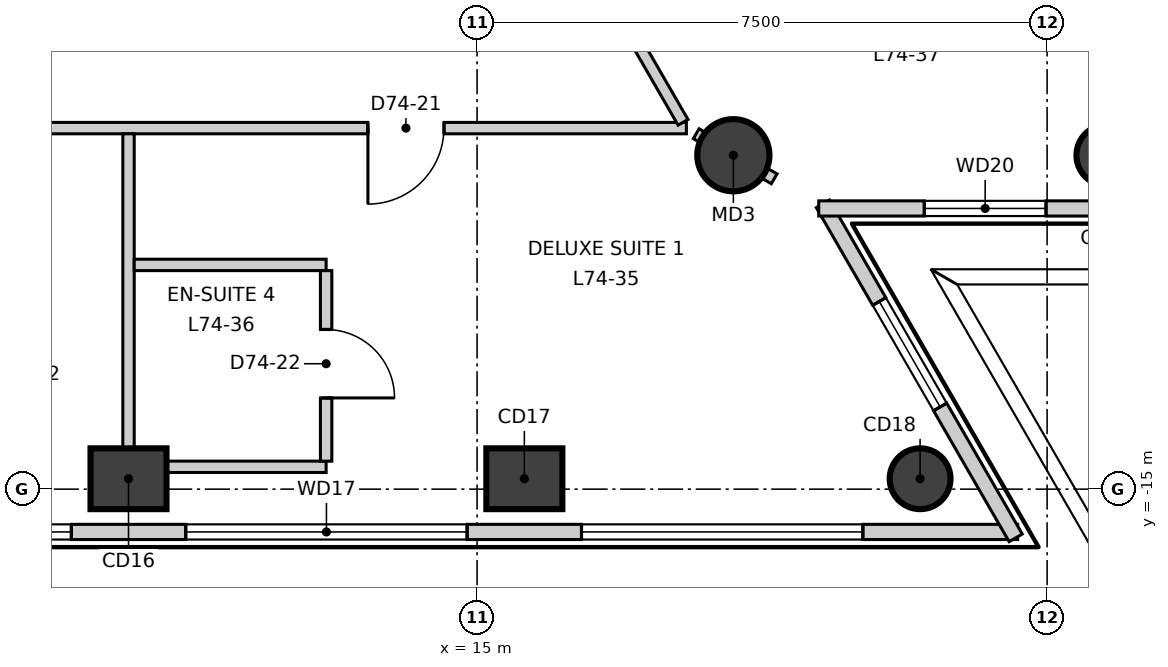
"""IFC4 building model, lengths in metres.
Left out: names, types, materials, properties, quantities, classifications, styles, units other than length and angle.
Written with IfcOpenShell. Run it as: python <this file> out.ifc"""

import sys

from ifc_helpers import new_model, si_unit, direction, frame, frame_2d, origin, origin_2d, place, context, subcontext, project, spatial, rectangle, circle, extrude, element, fill, save


model = new_model("IFC4")
c1 = context("Model", 3, precision=1e-05, world=origin(), true_north=direction((0.0, 1.0)))
c2 = subcontext(c1, "Body", "Model", "MODEL_VIEW")
j1 = project(units=[si_unit("LENGTHUNIT", "METRE"), si_unit("PLANEANGLEUNIT", "RADIAN")], contexts=[c1])
p1 = place(None, origin())
s1 = spatial("IfcSite", under=j1, at=p1, CompositionType="ELEMENT")
p2 = place(p1, origin())
s2 = spatial("IfcBuilding", under=s1, at=p2, CompositionType="ELEMENT")
p3 = place(p2, frame((0.0, 0.0, 311.5)))
s3 = spatial("IfcBuildingStorey", under=s2, at=p3, CompositionType="ELEMENT", Elevation=311.5)
for number, where, z_axis, x_axis in (
    (1, (10.414, -14.863, -0.3), (0.0, 0.0, 1.0), (1.0, 0.0, 0.0)),
    (2, (15.622, -14.863, -0.3), (0.0, 0.0, 1.0), (1.0, 0.0, 0.0)),
):
    element("IfcColumn", number, at=place(p3, frame(where, z_axis=z_axis, x_axis=x_axis)), inside=s3, PredefinedType="COLUMN", context=c2, shape_type="SweptSolid", body=[
        extrude(rectangle(XDim=1.0, YDim=0.8, at=origin_2d()), origin(), (0.0, 0.0, 1.0), 3.6),
    ])
for number, where, z_axis, x_axis in (
    (3, (20.829, -14.863, -0.3), (0.0, 0.0, 1.0), (1.0, 0.0, 0.0)),
    (4, (23.286, -10.607, -0.3), (0.0, 0.0, 1.0), (-0.5, 0.866, 0.0)),
):
    element("IfcColumn", number, at=place(p3, frame(where, z_axis=z_axis, x_axis=x_axis)), inside=s3, PredefinedType="COLUMN", context=c2, shape_type="SweptSolid", body=[
        extrude(circle(Radius=0.4, at=origin_2d()), origin(), (0.0, 0.0, 1.0), 3.6),
    ])
p4 = place(p3, frame((18.372, -10.607, -0.3), z_axis=(0.0, 0.0, 1.0), x_axis=(1.0, 0.0, 0.0)))
e5 = element("IfcColumn", 5, at=p4, inside=s3, PredefinedType="COLUMN", context=c2, shape_type="SweptSolid", body=[
    extrude(circle(Radius=0.475, at=origin_2d()), origin(), (0.0, 0.0, 1.0), 3.6),
])
p5 = place(p3, frame((-22.132, -15.563, 0.0), z_axis=(0.0, 0.0, 1.0), x_axis=(1.0, 0.0, 0.0)))
e6 = element("IfcWall", 6, at=p5, inside=s3, PredefinedType="ELEMENTEDWALL", context=c2, shape_type="SweptSolid", body=[
    extrude(rectangle(XDim=44.244, YDim=0.2, at=frame_2d((22.122, 0.0))), origin(), (0.0, 0.0, 1.0), 3.3),
])
p6 = place(p5, frame((2.057, 0.0, 0.9)))
e7 = element("IfcOpeningElement", 7, at=p6, cuts=e6, PredefinedType="OPENING", context=c2, shape_type="SweptSolid", body=[
    extrude(rectangle(XDim=3.7, YDim=2.2, at=frame_2d((1.85, 1.1))), frame((0.0, 0.11, 0.0), z_axis=(0.0, -1.0, 0.0), x_axis=(1.0, 0.0, 0.0)), (0.0, 0.0, 1.0), 0.22),
])
p7 = place(p5, frame((7.264, 0.0, 0.9)))
e8 = element("IfcOpeningElement", 8, at=p7, cuts=e6, PredefinedType="OPENING", context=c2, shape_type="SweptSolid", body=[
    extrude(rectangle(XDim=3.7, YDim=2.2, at=frame_2d((1.85, 1.1))), frame((0.0, 0.11, 0.0), z_axis=(0.0, -1.0, 0.0), x_axis=(1.0, 0.0, 0.0)), (0.0, 0.0, 1.0), 0.22),
])
p8 = place(p5, frame((12.471, 0.0, 0.9)))
e9 = element("IfcOpeningElement", 9, at=p8, cuts=e6, PredefinedType="OPENING", context=c2, shape_type="SweptSolid", body=[
    extrude(rectangle(XDim=3.7, YDim=2.2, at=frame_2d((1.85, 1.1))), frame((0.0, 0.11, 0.0), z_axis=(0.0, -1.0, 0.0), x_axis=(1.0, 0.0, 0.0)), (0.0, 0.0, 1.0), 0.22),
])
p9 = place(p5, frame((17.678, 0.0, 0.9)))
e10 = element("IfcOpeningElement", 10, at=p9, cuts=e6, PredefinedType="OPENING", context=c2, shape_type="SweptSolid", body=[
    extrude(rectangle(XDim=3.7, YDim=2.2, at=frame_2d((1.85, 1.1))), frame((0.0, 0.11, 0.0), z_axis=(0.0, -1.0, 0.0), x_axis=(1.0, 0.0, 0.0)), (0.0, 0.0, 1.0), 0.22),
])
p10 = place(p5, frame((22.886, 0.0, 0.9)))
e11 = element("IfcOpeningElement", 11, at=p10, cuts=e6, PredefinedType="OPENING", context=c2, shape_type="SweptSolid", body=[
    extrude(rectangle(XDim=3.7, YDim=2.2, at=frame_2d((1.85, 1.1))), frame((0.0, 0.11, 0.0), z_axis=(0.0, -1.0, 0.0), x_axis=(1.0, 0.0, 0.0)), (0.0, 0.0, 1.0), 0.22),
])
p11 = place(p5, frame((28.093, 0.0, 0.9)))
e12 = element("IfcOpeningElement", 12, at=p11, cuts=e6, PredefinedType="OPENING", context=c2, shape_type="SweptSolid", body=[
    extrude(rectangle(XDim=3.7, YDim=2.2, at=frame_2d((1.85, 1.1))), frame((0.0, 0.11, 0.0), z_axis=(0.0, -1.0, 0.0), x_axis=(1.0, 0.0, 0.0)), (0.0, 0.0, 1.0), 0.22),
])
p12 = place(p5, frame((33.3, 0.0, 0.9)))
e13 = element("IfcOpeningElement", 13, at=p12, cuts=e6, PredefinedType="OPENING", context=c2, shape_type="SweptSolid", body=[
    extrude(rectangle(XDim=3.7, YDim=2.2, at=frame_2d((1.85, 1.1))), frame((0.0, 0.11, 0.0), z_axis=(0.0, -1.0, 0.0), x_axis=(1.0, 0.0, 0.0)), (0.0, 0.0, 1.0), 0.22),
])
p13 = place(p5, frame((38.507, 0.0, 0.9)))
e14 = element("IfcOpeningElement", 14, at=p13, cuts=e6, PredefinedType="OPENING", context=c2, shape_type="SweptSolid", body=[
    extrude(rectangle(XDim=3.7, YDim=2.2, at=frame_2d((1.85, 1.1))), frame((0.0, 0.11, 0.0), z_axis=(0.0, -1.0, 0.0), x_axis=(1.0, 0.0, 0.0)), (0.0, 0.0, 1.0), 0.22),
])
p14 = place(p3, frame((22.087, -15.641, 0.0), z_axis=(0.0, 0.0, 1.0), x_axis=(-0.499911250765, 0.866076637116, 0.0)))
e15 = element("IfcWall", 15, at=p14, inside=s3, PredefinedType="ELEMENTEDWALL", context=c2, shape_type="SweptSolid", body=[
    extrude(rectangle(XDim=5.075, YDim=0.2, at=frame_2d((2.537, 0.0))), origin(), (0.0, 0.0, 1.0), 3.3),
])
p15 = place(p14, frame((1.99, 0.0, 0.9)))
e16 = element("IfcOpeningElement", 16, at=p15, cuts=e15, PredefinedType="OPENING", context=c2, shape_type="SweptSolid", body=[
    extrude(rectangle(XDim=1.6, YDim=2.2, at=frame_2d((0.8, 1.1))), frame((0.0, 0.11, 0.0), z_axis=(0.0, -1.0, 0.0), x_axis=(1.0, 0.0, 0.0)), (0.0, 0.0, 1.0), 0.22),
])
p16 = place(p3, frame((19.495, -11.307, 0.0), z_axis=(0.0, 0.0, 1.0), x_axis=(1.0, 0.0, 0.0)))
e17 = element("IfcWall", 17, at=p16, inside=s3, PredefinedType="ELEMENTEDWALL", context=c2, shape_type="SweptSolid", body=[
    extrude(rectangle(XDim=5.074, YDim=0.2, at=frame_2d((2.537, 0.0))), origin(), (0.0, 0.0, 1.0), 3.3),
])
p17 = place(p16, frame((1.39, 0.0, 0.9)))
e18 = element("IfcOpeningElement", 18, at=p17, cuts=e17, PredefinedType="OPENING", context=c2, shape_type="SweptSolid", body=[
    extrude(rectangle(XDim=1.6, YDim=2.2, at=frame_2d((0.8, 1.1))), frame((0.0, 0.11, 0.0), z_axis=(0.0, -1.0, 0.0), x_axis=(1.0, 0.0, 0.0)), (0.0, 0.0, 1.0), 0.22),
])
p18 = place(p3, frame((24.544, -11.385, 0.0), z_axis=(0.0, 0.0, 1.0), x_axis=(-0.500002044679, 0.866024223285, 0.0)))
e19 = element("IfcWall", 19, at=p18, inside=s3, PredefinedType="ELEMENTEDWALL", context=c2, shape_type="SweptSolid", body=[
    extrude(rectangle(XDim=44.243, YDim=0.2, at=frame_2d((22.122, 0.0))), origin(), (0.0, 0.0, 1.0), 3.3),
])
p19 = place(p18, frame((2.056, 0.0, 0.9)))
e20 = element("IfcOpeningElement", 20, at=p19, cuts=e19, PredefinedType="OPENING", context=c2, shape_type="SweptSolid", body=[
    extrude(rectangle(XDim=3.7, YDim=2.2, at=frame_2d((1.85, 1.1))), frame((0.0, 0.11, 0.0), z_axis=(0.0, -1.0, 0.0), x_axis=(1.0, 0.0, 0.0)), (0.0, 0.0, 1.0), 0.22),
])
p20 = place(p18, frame((7.264, 0.0, 0.9)))
e21 = element("IfcOpeningElement", 21, at=p20, cuts=e19, PredefinedType="OPENING", context=c2, shape_type="SweptSolid", body=[
    extrude(rectangle(XDim=3.7, YDim=2.2, at=frame_2d((1.85, 1.1))), frame((0.0, 0.11, 0.0), z_axis=(0.0, -1.0, 0.0), x_axis=(1.0, 0.0, 0.0)), (0.0, 0.0, 1.0), 0.22),
])
p21 = place(p18, frame((12.471, 0.0, 0.9)))
e22 = element("IfcOpeningElement", 22, at=p21, cuts=e19, PredefinedType="OPENING", context=c2, shape_type="SweptSolid", body=[
    extrude(rectangle(XDim=3.7, YDim=2.2, at=frame_2d((1.85, 1.1))), frame((0.0, 0.11, 0.0), z_axis=(0.0, -1.0, 0.0), x_axis=(1.0, 0.0, 0.0)), (0.0, 0.0, 1.0), 0.22),
])
p22 = place(p18, frame((17.678, 0.0, 0.9)))
e23 = element("IfcOpeningElement", 23, at=p22, cuts=e19, PredefinedType="OPENING", context=c2, shape_type="SweptSolid", body=[
    extrude(rectangle(XDim=3.7, YDim=2.2, at=frame_2d((1.85, 1.1))), frame((0.0, 0.11, 0.0), z_axis=(0.0, -1.0, 0.0), x_axis=(1.0, 0.0, 0.0)), (0.0, 0.0, 1.0), 0.22),
])
p23 = place(p18, frame((22.885, 0.0, 0.9)))
e24 = element("IfcOpeningElement", 24, at=p23, cuts=e19, PredefinedType="OPENING", context=c2, shape_type="SweptSolid", body=[
    extrude(rectangle(XDim=3.7, YDim=2.2, at=frame_2d((1.85, 1.1))), frame((0.0, 0.11, 0.0), z_axis=(0.0, -1.0, 0.0), x_axis=(1.0, 0.0, 0.0)), (0.0, 0.0, 1.0), 0.22),
])
p24 = place(p18, frame((28.093, 0.0, 0.9)))
e25 = element("IfcOpeningElement", 25, at=p24, cuts=e19, PredefinedType="OPENING", context=c2, shape_type="SweptSolid", body=[
    extrude(rectangle(XDim=3.7, YDim=2.2, at=frame_2d((1.85, 1.1))), frame((0.0, 0.11, 0.0), z_axis=(0.0, -1.0, 0.0), x_axis=(1.0, 0.0, 0.0)), (0.0, 0.0, 1.0), 0.22),
])
p25 = place(p18, frame((33.3, 0.0, 0.9)))
e26 = element("IfcOpeningElement", 26, at=p25, cuts=e19, PredefinedType="OPENING", context=c2, shape_type="SweptSolid", body=[
    extrude(rectangle(XDim=3.7, YDim=2.2, at=frame_2d((1.85, 1.1))), frame((0.0, 0.11, 0.0), z_axis=(0.0, -1.0, 0.0), x_axis=(1.0, 0.0, 0.0)), (0.0, 0.0, 1.0), 0.22),
])
p26 = place(p18, frame((38.507, 0.0, 0.9)))
e27 = element("IfcOpeningElement", 27, at=p26, cuts=e19, PredefinedType="OPENING", context=c2, shape_type="SweptSolid", body=[
    extrude(rectangle(XDim=3.7, YDim=2.2, at=frame_2d((1.85, 1.1))), frame((0.0, 0.11, 0.0), z_axis=(0.0, -1.0, 0.0), x_axis=(1.0, 0.0, 0.0)), (0.0, 0.0, 1.0), 0.22),
])
p27 = place(p3, frame((-17.604, -10.25, 0.0), z_axis=(0.0, 0.0, 1.0), x_axis=(1.0, 0.0, 0.0)))
e28 = element("IfcWall", 28, at=p27, inside=s3, PredefinedType="PARTITIONING", context=c2, shape_type="SweptSolid", body=[
    extrude(rectangle(XDim=35.358, YDim=0.15, at=frame_2d((17.679, 0.0))), origin(), (0.0, 0.0, 1.0), 3.3),
])
p28 = place(p27, frame((3.0, 0.0, 0.0)))
e29 = element("IfcOpeningElement", 29, at=p28, cuts=e28, PredefinedType="OPENING", context=c2, shape_type="SweptSolid", body=[
    extrude(rectangle(XDim=1.0, YDim=2.1, at=frame_2d((0.5, 1.05))), frame((0.0, 0.085, 0.0), z_axis=(0.0, -1.0, 0.0), x_axis=(1.0, 0.0, 0.0)), (0.0, 0.0, 1.0), 0.17),
])
p29 = place(p27, frame((15.14, 0.0, 0.0)))
e30 = element("IfcOpeningElement", 30, at=p29, cuts=e28, PredefinedType="OPENING", context=c2, shape_type="SweptSolid", body=[
    extrude(rectangle(XDim=1.0, YDim=2.1, at=frame_2d((0.5, 1.05))), frame((0.0, 0.085, 0.0), z_axis=(0.0, -1.0, 0.0), x_axis=(1.0, 0.0, 0.0)), (0.0, 0.0, 1.0), 0.17),
])
p30 = place(p27, frame((10.14, 0.0, 0.0)))
e31 = element("IfcOpeningElement", 31, at=p30, cuts=e28, PredefinedType="OPENING", context=c2, shape_type="SweptSolid", body=[
    extrude(rectangle(XDim=0.9, YDim=2.1, at=frame_2d((0.45, 1.05))), frame((0.0, 0.085, 0.0), z_axis=(0.0, -1.0, 0.0), x_axis=(1.0, 0.0, 0.0)), (0.0, 0.0, 1.0), 0.17),
])
p31 = place(p27, frame((12.24, 0.0, 0.0)))
e32 = element("IfcOpeningElement", 32, at=p31, cuts=e28, PredefinedType="OPENING", context=c2, shape_type="SweptSolid", body=[
    extrude(rectangle(XDim=0.9, YDim=2.1, at=frame_2d((0.45, 1.05))), frame((0.0, 0.085, 0.0), z_axis=(0.0, -1.0, 0.0), x_axis=(1.0, 0.0, 0.0)), (0.0, 0.0, 1.0), 0.17),
])
p32 = place(p27, frame((25.654, 0.0, 0.0)))
e33 = element("IfcOpeningElement", 33, at=p32, cuts=e28, PredefinedType="OPENING", context=c2, shape_type="SweptSolid", body=[
    extrude(rectangle(XDim=1.0, YDim=2.1, at=frame_2d((0.5, 1.05))), frame((0.0, 0.085, 0.0), z_axis=(0.0, -1.0, 0.0), x_axis=(1.0, 0.0, 0.0)), (0.0, 0.0, 1.0), 0.17),
])
p33 = place(p27, frame((20.554, 0.0, 0.0)))
e34 = element("IfcOpeningElement", 34, at=p33, cuts=e28, PredefinedType="OPENING", context=c2, shape_type="SweptSolid", body=[
    extrude(rectangle(XDim=0.9, YDim=2.1, at=frame_2d((0.45, 1.05))), frame((0.0, 0.085, 0.0), z_axis=(0.0, -1.0, 0.0), x_axis=(1.0, 0.0, 0.0)), (0.0, 0.0, 1.0), 0.17),
])
p34 = place(p27, frame((22.754, 0.0, 0.0)))
e35 = element("IfcOpeningElement", 35, at=p34, cuts=e28, PredefinedType="OPENING", context=c2, shape_type="SweptSolid", body=[
    extrude(rectangle(XDim=0.9, YDim=2.1, at=frame_2d((0.45, 1.05))), frame((0.0, 0.085, 0.0), z_axis=(0.0, -1.0, 0.0), x_axis=(1.0, 0.0, 0.0)), (0.0, 0.0, 1.0), 0.17),
])
p35 = place(p27, frame((31.168, 0.0, 0.0)))
e36 = element("IfcOpeningElement", 36, at=p35, cuts=e28, PredefinedType="OPENING", context=c2, shape_type="SweptSolid", body=[
    extrude(rectangle(XDim=1.0, YDim=2.1, at=frame_2d((0.5, 1.05))), frame((0.0, 0.085, 0.0), z_axis=(0.0, -1.0, 0.0), x_axis=(1.0, 0.0, 0.0)), (0.0, 0.0, 1.0), 0.17),
])
p36 = place(p3, frame((0.075, 20.37, 0.0), z_axis=(0.0, 0.0, 1.0), x_axis=(0.500006672087, -0.866021551619, 0.0)))
e37 = element("IfcWall", 37, at=p36, inside=s3, PredefinedType="PARTITIONING", context=c2, shape_type="SweptSolid", body=[
    extrude(rectangle(XDim=35.27, YDim=0.15, at=frame_2d((17.635, 0.0))), origin(), (0.0, 0.0, 1.0), 3.3),
])
p37 = place(p36, frame((31.206, 0.0, 0.0)))
e38 = element("IfcOpeningElement", 38, at=p37, cuts=e37, PredefinedType="OPENING", context=c2, shape_type="SweptSolid", body=[
    extrude(rectangle(XDim=1.0, YDim=2.1, at=frame_2d((0.5, 1.05))), frame((0.0, 0.085, 0.0), z_axis=(0.0, -1.0, 0.0), x_axis=(1.0, 0.0, 0.0)), (0.0, 0.0, 1.0), 0.17),
])
p38 = place(p36, frame((19.968, 0.0, 0.0)))
e39 = element("IfcOpeningElement", 39, at=p38, cuts=e37, PredefinedType="OPENING", context=c2, shape_type="SweptSolid", body=[
    extrude(rectangle(XDim=1.0, YDim=2.1, at=frame_2d((0.5, 1.05))), frame((0.0, 0.085, 0.0), z_axis=(0.0, -1.0, 0.0), x_axis=(1.0, 0.0, 0.0)), (0.0, 0.0, 1.0), 0.17),
])
p39 = place(p36, frame((13.353, 0.0, 0.0)))
e40 = element("IfcOpeningElement", 40, at=p39, cuts=e37, PredefinedType="OPENING", context=c2, shape_type="SweptSolid", body=[
    extrude(rectangle(XDim=1.0, YDim=2.1, at=frame_2d((0.5, 1.05))), frame((0.0, 0.085, 0.0), z_axis=(0.0, -1.0, 0.0), x_axis=(1.0, 0.0, 0.0)), (0.0, 0.0, 1.0), 0.17),
])
p40 = place(p36, frame((7.746, 0.0, 0.0)))
e41 = element("IfcOpeningElement", 41, at=p40, cuts=e37, PredefinedType="OPENING", context=c2, shape_type="SweptSolid", body=[
    extrude(rectangle(XDim=1.0, YDim=2.1, at=frame_2d((0.5, 1.05))), frame((0.0, 0.085, 0.0), z_axis=(0.0, -1.0, 0.0), x_axis=(1.0, 0.0, 0.0)), (0.0, 0.0, 1.0), 0.17),
])
p41 = place(p36, frame((3.038, 0.0, 0.0)))
e42 = element("IfcOpeningElement", 42, at=p41, cuts=e37, PredefinedType="OPENING", context=c2, shape_type="SweptSolid", body=[
    extrude(rectangle(XDim=1.0, YDim=2.1, at=frame_2d((0.5, 1.05))), frame((0.0, 0.085, 0.0), z_axis=(0.0, -1.0, 0.0), x_axis=(1.0, 0.0, 0.0)), (0.0, 0.0, 1.0), 0.17),
])
p42 = place(p3, frame((10.414, -14.858, 0.0), z_axis=(0.0, 0.0, 1.0), x_axis=(0.0, 1.0, 0.0)))
e43 = element("IfcWall", 43, at=p42, inside=s3, PredefinedType="PARTITIONING", context=c2, shape_type="SweptSolid", body=[
    extrude(rectangle(XDim=4.533, YDim=0.15, at=frame_2d((2.267, 0.0))), origin(), (0.0, 0.0, 1.0), 3.1),
])
p43 = place(p3, frame((17.883, -10.324, 0.0), z_axis=(0.0, 0.0, 1.0), x_axis=(0.865759938798, -0.500459517216, 0.0)))
e44 = element("IfcWall", 44, at=p43, inside=s3, PredefinedType="PARTITIONING", context=c2, shape_type="SweptSolid", body=[
    extrude(rectangle(XDim=1.185, YDim=0.15, at=frame_2d((0.593, 0.0))), origin(), (0.0, 0.0, 1.0), 2.8),
])
p44 = place(p3, frame((10.489, -12.05, 0.0), z_axis=(0.0, 0.0, 1.0), x_axis=(1.0, 0.0, 0.0)))
e45 = element("IfcWall", 45, at=p44, inside=s3, PredefinedType="PARTITIONING", context=c2, shape_type="SweptSolid", body=[
    extrude(rectangle(XDim=2.525, YDim=0.15, at=frame_2d((1.262, 0.0))), origin(), (0.0, 0.0, 1.0), 3.3),
])
p45 = place(p3, frame((10.489, -14.706, 0.0), z_axis=(0.0, 0.0, 1.0), x_axis=(1.0, 0.0, 0.0)))
e46 = element("IfcWall", 46, at=p45, inside=s3, PredefinedType="PARTITIONING", context=c2, shape_type="SweptSolid", body=[
    extrude(rectangle(XDim=2.525, YDim=0.15, at=frame_2d((1.262, 0.0))), origin(), (0.0, 0.0, 1.0), 2.6),
])
p46 = place(p3, frame((13.014, -14.632, 0.0), z_axis=(0.0, 0.0, 1.0), x_axis=(0.0, 1.0, 0.0)))
e47 = element("IfcWall", 47, at=p46, inside=s3, PredefinedType="PARTITIONING", context=c2, shape_type="SweptSolid", body=[
    extrude(rectangle(XDim=2.507, YDim=0.15, at=frame_2d((1.253, 0.0))), origin(), (0.0, 0.0, 1.0), 3.3),
])
p47 = place(p46, frame((0.832, 0.0, 0.0)))
e48 = element("IfcOpeningElement", 48, at=p47, cuts=e47, PredefinedType="OPENING", context=c2, shape_type="SweptSolid", body=[
    extrude(rectangle(XDim=0.9, YDim=2.1, at=frame_2d((0.45, 1.05))), frame((0.0, 0.085, 0.0), z_axis=(0.0, -1.0, 0.0), x_axis=(1.0, 0.0, 0.0)), (0.0, 0.0, 1.0), 0.17),
])
p48 = place(p11, origin())
e49 = element("IfcWindow", 49, at=p48, inside=s3, PartitioningType="SINGLE_PANEL", PredefinedType="WINDOW", context=c2, shape_type="SweptSolid", body=[
    extrude(rectangle(XDim=3.7, YDim=2.2, at=frame_2d((1.85, 1.1))), frame((0.0, 0.03, 0.0), z_axis=(0.0, -1.0, 0.0), x_axis=(1.0, 0.0, 0.0)), (0.0, 0.0, 1.0), 0.06),
])
fill(e12, e49)
p49 = place(p12, origin())
e50 = element("IfcWindow", 50, at=p49, inside=s3, PartitioningType="SINGLE_PANEL", PredefinedType="WINDOW", context=c2, shape_type="SweptSolid", body=[
    extrude(rectangle(XDim=3.7, YDim=2.2, at=frame_2d((1.85, 1.1))), frame((0.0, 0.03, 0.0), z_axis=(0.0, -1.0, 0.0), x_axis=(1.0, 0.0, 0.0)), (0.0, 0.0, 1.0), 0.06),
])
fill(e13, e50)
p50 = place(p13, origin())
e51 = element("IfcWindow", 51, at=p50, inside=s3, PartitioningType="SINGLE_PANEL", PredefinedType="WINDOW", context=c2, shape_type="SweptSolid", body=[
    extrude(rectangle(XDim=3.7, YDim=2.2, at=frame_2d((1.85, 1.1))), frame((0.0, 0.03, 0.0), z_axis=(0.0, -1.0, 0.0), x_axis=(1.0, 0.0, 0.0)), (0.0, 0.0, 1.0), 0.06),
])
fill(e14, e51)
p51 = place(p15, origin())
e52 = element("IfcWindow", 52, at=p51, inside=s3, PartitioningType="SINGLE_PANEL", PredefinedType="WINDOW", context=c2, shape_type="SweptSolid", body=[
    extrude(rectangle(XDim=1.6, YDim=2.2, at=frame_2d((0.8, 1.1))), frame((0.0, 0.03, 0.0), z_axis=(0.0, -1.0, 0.0), x_axis=(1.0, 0.0, 0.0)), (0.0, 0.0, 1.0), 0.06),
])
fill(e16, e52)
p52 = place(p17, origin())
e53 = element("IfcWindow", 53, at=p52, inside=s3, PartitioningType="SINGLE_PANEL", PredefinedType="WINDOW", context=c2, shape_type="SweptSolid", body=[
    extrude(rectangle(XDim=1.6, YDim=2.2, at=frame_2d((0.8, 1.1))), frame((0.0, 0.03, 0.0), z_axis=(0.0, -1.0, 0.0), x_axis=(1.0, 0.0, 0.0)), (0.0, 0.0, 1.0), 0.06),
])
fill(e18, e53)
p53 = place(p19, origin())
e54 = element("IfcWindow", 54, at=p53, inside=s3, PartitioningType="SINGLE_PANEL", PredefinedType="WINDOW", context=c2, shape_type="SweptSolid", body=[
    extrude(rectangle(XDim=3.7, YDim=2.2, at=frame_2d((1.85, 1.1))), frame((0.0, 0.03, 0.0), z_axis=(0.0, -1.0, 0.0), x_axis=(1.0, 0.0, 0.0)), (0.0, 0.0, 1.0), 0.06),
])
fill(e20, e54)
p54 = place(p35, origin())
e55 = element("IfcDoor", 55, at=p54, inside=s3, OperationType="SINGLE_SWING_LEFT", PredefinedType="DOOR", context=c2, shape_type="SweptSolid", body=[
    extrude(rectangle(XDim=1.0, YDim=2.1, at=frame_2d((0.5, 1.05))), frame((0.0, 0.025, 0.0), z_axis=(0.0, -1.0, 0.0), x_axis=(1.0, 0.0, 0.0)), (0.0, 0.0, 1.0), 0.05),
])
fill(e36, e55)
p55 = place(p47, origin())
e56 = element("IfcDoor", 56, at=p55, inside=s3, OperationType="SINGLE_SWING_LEFT", PredefinedType="DOOR", context=c2, shape_type="SweptSolid", body=[
    extrude(rectangle(XDim=0.9, YDim=2.1, at=frame_2d((0.45, 1.05))), frame((0.0, 0.025, 0.0), z_axis=(0.0, -1.0, 0.0), x_axis=(1.0, 0.0, 0.0)), (0.0, 0.0, 1.0), 0.05),
])
fill(e48, e56)
save(model, sys.argv[1])
